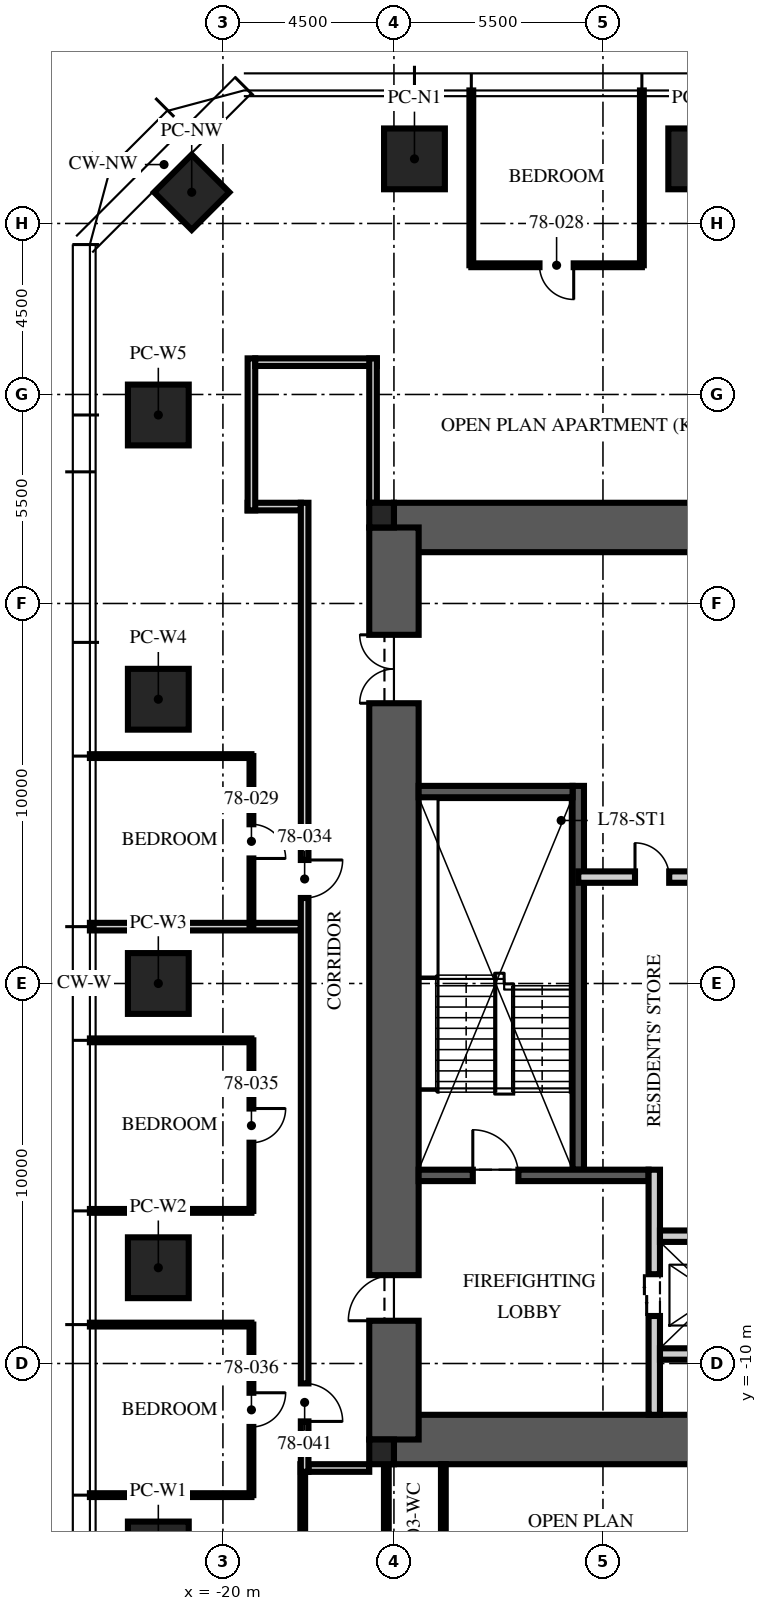
"""IFC4 building model, lengths in metres.
Left out: names, types, materials, properties, quantities, classifications, styles, units other than length and angle.
Written with IfcOpenShell. Run it as: python <this file> out.ifc"""

import sys

from ifc_helpers import new_model, si_unit, direction, frame, frame_2d, origin, origin_2d, place, context, subcontext, project, spatial, rectangle, extrude, element, fill, save


model = new_model("IFC4")
c1 = context("Model", 3, precision=1e-05, world=origin(), true_north=direction((0.0, 1.0)))
c2 = subcontext(c1, "Body", "Model", "MODEL_VIEW")
j1 = project(units=[si_unit("LENGTHUNIT", "METRE"), si_unit("PLANEANGLEUNIT", "RADIAN")], contexts=[c1])
p1 = place(None, origin())
s1 = spatial("IfcSite", under=j1, at=p1, CompositionType="ELEMENT")
p2 = place(p1, origin())
s2 = spatial("IfcBuilding", under=s1, at=p2, CompositionType="ELEMENT")
p3 = place(p2, frame((0.0, 0.0, 312.0)))
s3 = spatial("IfcBuildingStorey", under=s2, at=p3, CompositionType="ELEMENT", Elevation=312.0)
for number, where, z_axis, x_axis in (
    (1, (-15.5, 12.0, -0.25), (0.0, 0.0, 1.0), (1.0, 0.0, 0.0)),
    (2, (-15.5, -12.0, -0.25), (0.0, 0.0, 1.0), (1.0, 0.0, 0.0)),
):
    element("IfcWall", number, at=place(p3, frame(where, z_axis=z_axis, x_axis=x_axis)), inside=s3, PredefinedType="SHEAR", context=c2, shape_type="SweptSolid", body=[
        extrude(rectangle(XDim=31.0, YDim=1.3, at=frame_2d((15.5, 0.0))), origin(), (0.0, 0.0, 1.0), 3.75),
    ])
p4 = place(p3, frame((-15.5, -12.0, -0.25), z_axis=(0.0, 0.0, 1.0), x_axis=(0.0, 1.0, 0.0)))
e3 = element("IfcWall", 3, at=p4, inside=s3, PredefinedType="SHEAR", context=c2, shape_type="SweptSolid", body=[
    extrude(rectangle(XDim=24.0, YDim=1.3, at=frame_2d((12.0, 0.0))), origin(), (0.0, 0.0, 1.0), 3.75),
])
p5 = place(p4, frame((3.125, 0.0, 0.25)))
e4 = element("IfcOpeningElement", 4, at=p5, cuts=e3, PredefinedType="OPENING", context=c2, shape_type="SweptSolid", body=[
    extrude(rectangle(XDim=1.2, YDim=2.1, at=frame_2d((0.6, 1.05))), frame((0.0, 0.66, 0.0), z_axis=(0.0, -1.0, 0.0), x_axis=(1.0, 0.0, 0.0)), (0.0, 0.0, 1.0), 1.32),
])
p6 = place(p4, frame((19.375, 0.0, 0.25)))
e5 = element("IfcOpeningElement", 5, at=p6, cuts=e3, PredefinedType="OPENING", context=c2, shape_type="SweptSolid", body=[
    extrude(rectangle(XDim=1.8, YDim=2.1, at=frame_2d((0.9, 1.05))), frame((0.0, 0.66, 0.0), z_axis=(0.0, -1.0, 0.0), x_axis=(1.0, 0.0, 0.0)), (0.0, 0.0, 1.0), 1.32),
])
for number, where, z_axis, x_axis in (
    (6, (-15.825, 12.325, -0.25), (0.0, 0.0, 1.0), (1.0, 0.0, 0.0)),
    (7, (-15.825, -12.325, -0.25), (0.0, 0.0, 1.0), (1.0, 0.0, 0.0)),
):
    element("IfcColumn", number, at=place(p3, frame(where, z_axis=z_axis, x_axis=x_axis)), inside=s3, PredefinedType="COLUMN", context=c2, shape_type="SweptSolid", body=[
        extrude(rectangle(XDim=0.65, YDim=0.65, at=origin_2d()), origin(), (0.0, 0.0, 1.0), 3.75),
    ])
for number, where, z_axis, x_axis in (
    (8, (-14.96, 21.7, 0.0), (0.0, 0.0, 1.0), (1.0, 0.0, 0.0)),
    (9, (-7.48, 21.7, 0.0), (0.0, 0.0, 1.0), (1.0, 0.0, 0.0)),
    (10, (-21.7, -14.96, 0.0), (0.0, 0.0, 1.0), (0.0, 1.0, 0.0)),
    (11, (-21.7, -7.48, 0.0), (0.0, 0.0, 1.0), (0.0, 1.0, 0.0)),
    (12, (-21.7, 0.0, 0.0), (0.0, 0.0, 1.0), (0.0, 1.0, 0.0)),
    (13, (-21.7, 7.48, 0.0), (0.0, 0.0, 1.0), (0.0, 1.0, 0.0)),
    (14, (-21.7, 14.96, 0.0), (0.0, 0.0, 1.0), (0.0, 1.0, 0.0)),
):
    element("IfcColumn", number, at=place(p3, frame(where, z_axis=z_axis, x_axis=x_axis)), inside=s3, PredefinedType="COLUMN", context=c2, shape_type="SweptSolid", body=[
        extrude(rectangle(XDim=1.6, YDim=1.6, at=origin_2d()), origin(), (0.0, 0.0, 1.0), 3.75),
    ])
p7 = place(p3, frame((-20.821, 20.821, 0.0), z_axis=(0.0, 0.0, 1.0), x_axis=(0.707106781187, 0.707106781187, 0.0)))
e15 = element("IfcColumn", 15, at=p7, inside=s3, PredefinedType="COLUMN", context=c2, shape_type="SweptSolid", body=[
    extrude(rectangle(XDim=1.4, YDim=1.4, at=origin_2d()), origin(), (0.0, 0.0, 1.0), 3.75),
])
p8 = place(p3, frame((-10.65, -4.9, 0.0), z_axis=(0.0, 0.0, 1.0), x_axis=(0.0, 1.0, 0.0)))
e16 = element("IfcWall", 16, at=p8, inside=s3, PredefinedType="SOLIDWALL", context=c2, shape_type="SweptSolid", body=[
    extrude(rectangle(XDim=10.1, YDim=0.3, at=frame_2d((5.05, 0.0))), origin(), (0.0, 0.0, 1.0), 3.5),
])
p9 = place(p3, frame((-14.85, -5.05, 0.0), z_axis=(0.0, 0.0, 1.0), x_axis=(1.0, 0.0, 0.0)))
e17 = element("IfcWall", 17, at=p9, inside=s3, PredefinedType="SOLIDWALL", context=c2, shape_type="SweptSolid", body=[
    extrude(rectangle(XDim=6.05, YDim=0.3, at=frame_2d((3.025, 0.0))), origin(), (0.0, 0.0, 1.0), 3.5),
])
p10 = place(p9, frame((1.425, 0.0, 0.0)))
e18 = element("IfcOpeningElement", 18, at=p10, cuts=e17, PredefinedType="OPENING", context=c2, shape_type="SweptSolid", body=[
    extrude(rectangle(XDim=1.2, YDim=2.1, at=frame_2d((0.6, 1.05))), frame((0.0, 0.16, 0.0), z_axis=(0.0, -1.0, 0.0), x_axis=(1.0, 0.0, 0.0)), (0.0, 0.0, 1.0), 0.32),
])
p11 = place(p3, frame((-14.85, 5.05, 0.0), z_axis=(0.0, 0.0, 1.0), x_axis=(1.0, 0.0, 0.0)))
e19 = element("IfcWall", 19, at=p11, inside=s3, PredefinedType="SOLIDWALL", context=c2, shape_type="SweptSolid", body=[
    extrude(rectangle(XDim=4.05, YDim=0.3, at=frame_2d((2.025, 0.0))), origin(), (0.0, 0.0, 1.0), 3.5),
])
p12 = place(p3, frame((-8.65, -11.35, 0.0), z_axis=(0.0, 0.0, 1.0), x_axis=(0.0, 1.0, 0.0)))
e20 = element("IfcWall", 20, at=p12, inside=s3, PredefinedType="PARTITIONING", context=c2, shape_type="SweptSolid", body=[
    extrude(rectangle(XDim=6.45, YDim=0.3, at=frame_2d((3.225, 0.0))), origin(), (0.0, 0.0, 1.0), 3.5),
])
p13 = place(p12, frame((2.6, 0.0, 0.0)))
e21 = element("IfcOpeningElement", 21, at=p13, cuts=e20, PredefinedType="OPENING", context=c2, shape_type="SweptSolid", body=[
    extrude(rectangle(XDim=1.1, YDim=2.1, at=frame_2d((0.55, 1.05))), frame((0.0, 0.16, 0.0), z_axis=(0.0, -1.0, 0.0), x_axis=(1.0, 0.0, 0.0)), (0.0, 0.0, 1.0), 0.32),
])
p14 = place(p3, frame((-8.5, -6.65, 0.0), z_axis=(0.0, 0.0, 1.0), x_axis=(1.0, 0.0, 0.0)))
e22 = element("IfcWall", 22, at=p14, inside=s3, PredefinedType="PARTITIONING", context=c2, shape_type="SweptSolid", body=[
    extrude(rectangle(XDim=17.0, YDim=0.3, at=frame_2d((8.5, 0.0))), origin(), (0.0, 0.0, 1.0), 3.5),
])
p15 = place(p14, frame((7.8, 0.0, 0.0)))
e23 = element("IfcOpeningElement", 23, at=p15, cuts=e22, PredefinedType="OPENING", context=c2, shape_type="SweptSolid", body=[
    extrude(rectangle(XDim=1.3, YDim=2.4, at=frame_2d((0.65, 1.2))), frame((0.0, 0.16, 0.0), z_axis=(0.0, -1.0, 0.0), x_axis=(1.0, 0.0, 0.0)), (0.0, 0.0, 1.0), 0.32),
])
p16 = place(p14, frame((5.65, 0.0, 0.0)))
e24 = element("IfcOpeningElement", 24, at=p16, cuts=e22, PredefinedType="OPENING", context=c2, shape_type="SweptSolid", body=[
    extrude(rectangle(XDim=0.9, YDim=2.1, at=frame_2d((0.45, 1.05))), frame((0.0, 0.16, 0.0), z_axis=(0.0, -1.0, 0.0), x_axis=(1.0, 0.0, 0.0)), (0.0, 0.0, 1.0), 0.32),
])
p17 = place(p14, frame((10.4, 0.0, 0.0)))
e25 = element("IfcOpeningElement", 25, at=p17, cuts=e22, PredefinedType="OPENING", context=c2, shape_type="SweptSolid", body=[
    extrude(rectangle(XDim=0.9, YDim=2.1, at=frame_2d((0.45, 1.05))), frame((0.0, 0.16, 0.0), z_axis=(0.0, -1.0, 0.0), x_axis=(1.0, 0.0, 0.0)), (0.0, 0.0, 1.0), 0.32),
])
p18 = place(p3, frame((-8.5, -9.75, 0.0), z_axis=(0.0, 0.0, 1.0), x_axis=(1.0, 0.0, 0.0)))
e26 = element("IfcWall", 26, at=p18, inside=s3, PredefinedType="PARTITIONING", context=c2, shape_type="SweptSolid", body=[
    extrude(rectangle(XDim=2.9, YDim=0.3, at=frame_2d((1.45, 0.0))), origin(), (0.0, 0.0, 1.0), 3.5),
])
p19 = place(p3, frame((-10.65, 2.8, 0.0), z_axis=(0.0, 0.0, 1.0), x_axis=(1.0, 0.0, 0.0)))
e27 = element("IfcWall", 27, at=p19, inside=s3, PredefinedType="PARTITIONING", context=c2, shape_type="SweptSolid", body=[
    extrude(rectangle(XDim=21.3, YDim=0.3, at=frame_2d((10.65, 0.0))), origin(), (0.0, 0.0, 1.0), 3.5),
])
p20 = place(p19, frame((10.05, 0.0, 0.0)))
e28 = element("IfcOpeningElement", 28, at=p20, cuts=e27, PredefinedType="OPENING", context=c2, shape_type="SweptSolid", body=[
    extrude(rectangle(XDim=1.2, YDim=2.1, at=frame_2d((0.6, 1.05))), frame((0.0, 0.16, 0.0), z_axis=(0.0, -1.0, 0.0), x_axis=(1.0, 0.0, 0.0)), (0.0, 0.0, 1.0), 0.32),
])
p21 = place(p19, frame((1.493, 0.0, 0.0)))
e29 = element("IfcOpeningElement", 29, at=p21, cuts=e27, PredefinedType="OPENING", context=c2, shape_type="SweptSolid", body=[
    extrude(rectangle(XDim=0.9, YDim=2.1, at=frame_2d((0.45, 1.05))), frame((0.0, 0.16, 0.0), z_axis=(0.0, -1.0, 0.0), x_axis=(1.0, 0.0, 0.0)), (0.0, 0.0, 1.0), 0.32),
])
p22 = place(p19, frame((18.836, 0.0, 0.0)))
e30 = element("IfcOpeningElement", 30, at=p22, cuts=e27, PredefinedType="OPENING", context=c2, shape_type="SweptSolid", body=[
    extrude(rectangle(XDim=0.9, YDim=2.1, at=frame_2d((0.45, 1.05))), frame((0.0, 0.16, 0.0), z_axis=(0.0, -1.0, 0.0), x_axis=(1.0, 0.0, 0.0)), (0.0, 0.0, 1.0), 0.32),
])
p23 = place(p3, frame((-17.95, 12.55, 0.0), z_axis=(0.0, 0.0, 1.0), x_axis=(-1.0, 0.0, 0.0)))
e31 = element("IfcWall", 31, at=p23, inside=s3, PredefinedType="PARTITIONING", context=c2, shape_type="SweptSolid", body=[
    extrude(rectangle(XDim=1.4, YDim=0.2, at=frame_2d((0.7, 0.0))), origin(), (0.0, 0.0, 1.0), 3.5),
])
p24 = place(p3, frame((-19.25, 12.45, 0.0), z_axis=(0.0, 0.0, 1.0), x_axis=(0.0, 1.0, 0.0)))
e32 = element("IfcWall", 32, at=p24, inside=s3, PredefinedType="PARTITIONING", context=c2, shape_type="SweptSolid", body=[
    extrude(rectangle(XDim=4.0, YDim=0.2, at=frame_2d((2.0, 0.0))), origin(), (0.0, 0.0, 1.0), 2.9),
])
p25 = place(p3, frame((-19.15, 16.35, 0.0), z_axis=(0.0, 0.0, 1.0), x_axis=(1.0, 0.0, 0.0)))
e33 = element("IfcWall", 33, at=p25, inside=s3, PredefinedType="PARTITIONING", context=c2, shape_type="SweptSolid", body=[
    extrude(rectangle(XDim=3.2, YDim=0.2, at=frame_2d((1.6, 0.0))), origin(), (0.0, 0.0, 1.0), 2.6),
])
p26 = place(p3, frame((-16.05, 16.45, 0.0), z_axis=(0.0, 0.0, 1.0), x_axis=(0.0, -1.0, 0.0)))
e34 = element("IfcWall", 34, at=p26, inside=s3, PredefinedType="PARTITIONING", context=c2, shape_type="SweptSolid", body=[
    extrude(rectangle(XDim=3.8, YDim=0.2, at=frame_2d((1.9, 0.0))), origin(), (0.0, 0.0, 1.0), 2.6),
])
p27 = place(p3, frame((-16.15, -12.75, 0.0), z_axis=(0.0, 0.0, 1.0), x_axis=(-1.0, 0.0, 0.0)))
e35 = element("IfcWall", 35, at=p27, inside=s3, PredefinedType="PARTITIONING", context=c2, shape_type="SweptSolid", body=[
    extrude(rectangle(XDim=1.6, YDim=0.2, at=frame_2d((0.8, 0.0))), origin(), (0.0, 0.0, 1.0), 2.6),
])
for number, where, z_axis, x_axis in (
    (36, (-8.976, 18.9, 0.0), (0.0, 0.0, 1.0), (0.0, 1.0, 0.0)),
    (37, (-13.464, 18.9, 0.0), (0.0, 0.0, 1.0), (0.0, 1.0, 0.0)),
):
    element("IfcWall", number, at=place(p3, frame(where, z_axis=z_axis, x_axis=x_axis)), inside=s3, PredefinedType="PARTITIONING", context=c2, shape_type="SweptSolid", body=[
        extrude(rectangle(XDim=4.6, YDim=0.1, at=frame_2d((2.3, 0.0))), origin(), (0.0, 0.0, 1.0), 3.01),
    ])
p28 = place(p3, frame((-19.25, 5.984, 0.0), z_axis=(0.0, 0.0, 1.0), x_axis=(-1.0, 0.0, 0.0)))
e38 = element("IfcWall", 38, at=p28, inside=s3, PredefinedType="PARTITIONING", context=c2, shape_type="SweptSolid", body=[
    extrude(rectangle(XDim=4.25, YDim=0.1, at=frame_2d((2.125, 0.0))), origin(), (0.0, 0.0, 1.0), 3.01),
])
p29 = place(p3, frame((-17.95, 1.496, 0.0), z_axis=(0.0, 0.0, 1.0), x_axis=(-1.0, 0.0, 0.0)))
e39 = element("IfcWall", 39, at=p29, inside=s3, PredefinedType="PARTITIONING", context=c2, shape_type="SweptSolid", body=[
    extrude(rectangle(XDim=5.55, YDim=0.2, at=frame_2d((2.775, 0.0))), origin(), (0.0, 0.0, 1.0), 3.01),
])
for number, where, z_axis, x_axis in (
    (40, (-19.25, -1.496, 0.0), (0.0, 0.0, 1.0), (-1.0, 0.0, 0.0)),
    (41, (-19.25, -5.984, 0.0), (0.0, 0.0, 1.0), (-1.0, 0.0, 0.0)),
    (42, (-19.25, -8.976, 0.0), (0.0, 0.0, 1.0), (-1.0, 0.0, 0.0)),
    (43, (-19.25, -13.464, 0.0), (0.0, 0.0, 1.0), (-1.0, 0.0, 0.0)),
):
    element("IfcWall", number, at=place(p3, frame(where, z_axis=z_axis, x_axis=x_axis)), inside=s3, PredefinedType="PARTITIONING", context=c2, shape_type="SweptSolid", body=[
        extrude(rectangle(XDim=4.25, YDim=0.1, at=frame_2d((2.125, 0.0))), origin(), (0.0, 0.0, 1.0), 3.01),
    ])
p30 = place(p3, frame((-8.976, 18.9, 0.0), z_axis=(0.0, 0.0, 1.0), x_axis=(-1.0, 0.0, 0.0)))
e44 = element("IfcWall", 44, at=p30, inside=s3, PredefinedType="PARTITIONING", context=c2, shape_type="SweptSolid", body=[
    extrude(rectangle(XDim=4.488, YDim=0.1, at=frame_2d((2.244, 0.0))), origin(), (0.0, 0.0, 1.0), 2.91),
])
p31 = place(p30, frame((1.794, 0.0, 0.0)))
e45 = element("IfcOpeningElement", 45, at=p31, cuts=e44, PredefinedType="OPENING", context=c2, shape_type="SweptSolid", body=[
    extrude(rectangle(XDim=0.9, YDim=2.1, at=frame_2d((0.45, 1.05))), frame((0.0, 0.06, 0.0), z_axis=(0.0, -1.0, 0.0), x_axis=(1.0, 0.0, 0.0)), (0.0, 0.0, 1.0), 0.12),
])
p32 = place(p3, frame((-19.25, 5.984, 0.0), z_axis=(0.0, 0.0, 1.0), x_axis=(0.0, -1.0, 0.0)))
e46 = element("IfcWall", 46, at=p32, inside=s3, PredefinedType="PARTITIONING", context=c2, shape_type="SweptSolid", body=[
    extrude(rectangle(XDim=4.488, YDim=0.1, at=frame_2d((2.244, 0.0))), origin(), (0.0, 0.0, 1.0), 2.91),
])
p33 = place(p32, frame((1.794, 0.0, 0.0)))
e47 = element("IfcOpeningElement", 47, at=p33, cuts=e46, PredefinedType="OPENING", context=c2, shape_type="SweptSolid", body=[
    extrude(rectangle(XDim=0.9, YDim=2.1, at=frame_2d((0.45, 1.05))), frame((0.0, 0.06, 0.0), z_axis=(0.0, -1.0, 0.0), x_axis=(1.0, 0.0, 0.0)), (0.0, 0.0, 1.0), 0.12),
])
p34 = place(p3, frame((-19.25, -1.496, 0.0), z_axis=(0.0, 0.0, 1.0), x_axis=(0.0, -1.0, 0.0)))
e48 = element("IfcWall", 48, at=p34, inside=s3, PredefinedType="PARTITIONING", context=c2, shape_type="SweptSolid", body=[
    extrude(rectangle(XDim=4.488, YDim=0.1, at=frame_2d((2.244, 0.0))), origin(), (0.0, 0.0, 1.0), 2.91),
])
p35 = place(p34, frame((1.794, 0.0, 0.0)))
e49 = element("IfcOpeningElement", 49, at=p35, cuts=e48, PredefinedType="OPENING", context=c2, shape_type="SweptSolid", body=[
    extrude(rectangle(XDim=0.9, YDim=2.1, at=frame_2d((0.45, 1.05))), frame((0.0, 0.06, 0.0), z_axis=(0.0, -1.0, 0.0), x_axis=(1.0, 0.0, 0.0)), (0.0, 0.0, 1.0), 0.12),
])
p36 = place(p3, frame((-19.25, -8.976, 0.0), z_axis=(0.0, 0.0, 1.0), x_axis=(0.0, -1.0, 0.0)))
e50 = element("IfcWall", 50, at=p36, inside=s3, PredefinedType="PARTITIONING", context=c2, shape_type="SweptSolid", body=[
    extrude(rectangle(XDim=4.488, YDim=0.1, at=frame_2d((2.244, 0.0))), origin(), (0.0, 0.0, 1.0), 2.91),
])
p37 = place(p36, frame((1.794, 0.0, 0.0)))
e51 = element("IfcOpeningElement", 51, at=p37, cuts=e50, PredefinedType="OPENING", context=c2, shape_type="SweptSolid", body=[
    extrude(rectangle(XDim=0.9, YDim=2.1, at=frame_2d((0.45, 1.05))), frame((0.0, 0.06, 0.0), z_axis=(0.0, -1.0, 0.0), x_axis=(1.0, 0.0, 0.0)), (0.0, 0.0, 1.0), 0.12),
])
for number, where, z_axis, x_axis in (
    (52, (-17.9, -12.65, 0.0), (0.0, 0.0, 1.0), (0.0, -1.0, 0.0)),
    (53, (-15.7, -12.65, 0.0), (0.0, 0.0, 1.0), (0.0, -1.0, 0.0)),
):
    element("IfcWall", number, at=place(p3, frame(where, z_axis=z_axis, x_axis=x_axis)), inside=s3, PredefinedType="PARTITIONING", context=c2, shape_type="SweptSolid", body=[
        extrude(rectangle(XDim=4.096, YDim=0.125, at=frame_2d((2.048, 0.0))), origin(), (0.0, 0.0, 1.0), 2.6),
    ])
p38 = place(p3, frame((-14.2, -12.65, 0.0), z_axis=(0.0, 0.0, 1.0), x_axis=(0.0, -1.0, 0.0)))
e54 = element("IfcWall", 54, at=p38, inside=s3, PredefinedType="PARTITIONING", context=c2, shape_type="SweptSolid", body=[
    extrude(rectangle(XDim=4.096, YDim=0.125, at=frame_2d((2.048, 0.0))), origin(), (0.0, 0.0, 1.0), 3.5),
])
p39 = place(p3, frame((-17.85, 12.65, 0.0), z_axis=(0.0, 0.0, 1.0), x_axis=(0.0, -1.0, 0.0)))
e55 = element("IfcWall", 55, at=p39, inside=s3, PredefinedType="PARTITIONING", context=c2, shape_type="SweptSolid", body=[
    extrude(rectangle(XDim=25.5, YDim=0.2, at=frame_2d((12.75, 0.0))), origin(), (0.0, 0.0, 1.0), 2.9),
])
p40 = place(p39, frame((9.4, 0.0, 0.0)))
e56 = element("IfcOpeningElement", 56, at=p40, cuts=e55, PredefinedType="OPENING", context=c2, shape_type="SweptSolid", body=[
    extrude(rectangle(XDim=1.0, YDim=2.2, at=frame_2d((0.5, 1.1))), frame((0.0, 0.11, 0.0), z_axis=(0.0, -1.0, 0.0), x_axis=(1.0, 0.0, 0.0)), (0.0, 0.0, 1.0), 0.22),
])
p41 = place(p39, frame((23.174, 0.0, 0.0)))
e57 = element("IfcOpeningElement", 57, at=p41, cuts=e55, PredefinedType="OPENING", context=c2, shape_type="SweptSolid", body=[
    extrude(rectangle(XDim=1.0, YDim=2.2, at=frame_2d((0.5, 1.1))), frame((0.0, 0.11, 0.0), z_axis=(0.0, -1.0, 0.0), x_axis=(1.0, 0.0, 0.0)), (0.0, 0.0, 1.0), 0.22),
])
p42 = place(p10, origin())
e58 = element("IfcDoor", 58, at=p42, inside=s3, OperationType="SINGLE_SWING_LEFT", PredefinedType="DOOR", context=c2, shape_type="SweptSolid", body=[
    extrude(rectangle(XDim=1.2, YDim=2.1, at=frame_2d((0.6, 1.05))), frame((0.0, 0.025, 0.0), z_axis=(0.0, -1.0, 0.0), x_axis=(1.0, 0.0, 0.0)), (0.0, 0.0, 1.0), 0.05),
])
fill(e18, e58)
p43 = place(p5, origin())
e59 = element("IfcDoor", 59, at=p43, inside=s3, OperationType="SINGLE_SWING_LEFT", PredefinedType="DOOR", context=c2, shape_type="SweptSolid", body=[
    extrude(rectangle(XDim=1.2, YDim=2.1, at=frame_2d((0.6, 1.05))), frame((0.0, 0.025, 0.0), z_axis=(0.0, -1.0, 0.0), x_axis=(1.0, 0.0, 0.0)), (0.0, 0.0, 1.0), 0.05),
])
fill(e4, e59)
p44 = place(p6, origin())
e60 = element("IfcDoor", 60, at=p44, inside=s3, OperationType="DOUBLE_DOOR_SINGLE_SWING", PredefinedType="DOOR", context=c2, shape_type="SweptSolid", body=[
    extrude(rectangle(XDim=1.8, YDim=2.1, at=frame_2d((0.9, 1.05))), frame((0.0, 0.025, 0.0), z_axis=(0.0, -1.0, 0.0), x_axis=(1.0, 0.0, 0.0)), (0.0, 0.0, 1.0), 0.05),
])
fill(e5, e60)
p45 = place(p13, origin())
e61 = element("IfcDoor", 61, at=p45, inside=s3, OperationType="DOUBLE_DOOR_SLIDING", PredefinedType="DOOR", context=c2, shape_type="SweptSolid", body=[
    extrude(rectangle(XDim=1.1, YDim=2.1, at=frame_2d((0.55, 1.05))), frame((0.0, 0.025, 0.0), z_axis=(0.0, -1.0, 0.0), x_axis=(1.0, 0.0, 0.0)), (0.0, 0.0, 1.0), 0.05),
])
fill(e21, e61)
p46 = place(p21, origin())
e62 = element("IfcDoor", 62, at=p46, inside=s3, OperationType="SINGLE_SWING_LEFT", PredefinedType="DOOR", context=c2, shape_type="SweptSolid", body=[
    extrude(rectangle(XDim=0.9, YDim=2.1, at=frame_2d((0.45, 1.05))), frame((0.0, 0.025, 0.0), z_axis=(0.0, -1.0, 0.0), x_axis=(1.0, 0.0, 0.0)), (0.0, 0.0, 1.0), 0.05),
])
fill(e29, e62)
p47 = place(p31, origin())
e63 = element("IfcDoor", 63, at=p47, inside=s3, OperationType="SINGLE_SWING_LEFT", PredefinedType="DOOR", context=c2, shape_type="SweptSolid", body=[
    extrude(rectangle(XDim=0.9, YDim=2.1, at=frame_2d((0.45, 1.05))), frame((0.0, 0.025, 0.0), z_axis=(0.0, -1.0, 0.0), x_axis=(1.0, 0.0, 0.0)), (0.0, 0.0, 1.0), 0.05),
])
fill(e45, e63)
p48 = place(p33, origin())
e64 = element("IfcDoor", 64, at=p48, inside=s3, OperationType="SINGLE_SWING_RIGHT", PredefinedType="DOOR", context=c2, shape_type="SweptSolid", body=[
    extrude(rectangle(XDim=0.9, YDim=2.1, at=frame_2d((0.45, 1.05))), frame((0.0, 0.025, 0.0), z_axis=(0.0, -1.0, 0.0), x_axis=(1.0, 0.0, 0.0)), (0.0, 0.0, 1.0), 0.05),
])
fill(e47, e64)
p49 = place(p40, origin())
e65 = element("IfcDoor", 65, at=p49, inside=s3, OperationType="SINGLE_SWING_LEFT", PredefinedType="DOOR", context=c2, shape_type="SweptSolid", body=[
    extrude(rectangle(XDim=1.0, YDim=2.2, at=frame_2d((0.5, 1.1))), frame((0.0, 0.025, 0.0), z_axis=(0.0, -1.0, 0.0), x_axis=(1.0, 0.0, 0.0)), (0.0, 0.0, 1.0), 0.05),
])
fill(e56, e65)
p50 = place(p35, origin())
e66 = element("IfcDoor", 66, at=p50, inside=s3, OperationType="SINGLE_SWING_LEFT", PredefinedType="DOOR", context=c2, shape_type="SweptSolid", body=[
    extrude(rectangle(XDim=0.9, YDim=2.1, at=frame_2d((0.45, 1.05))), frame((0.0, 0.025, 0.0), z_axis=(0.0, -1.0, 0.0), x_axis=(1.0, 0.0, 0.0)), (0.0, 0.0, 1.0), 0.05),
])
fill(e49, e66)
p51 = place(p37, origin())
e67 = element("IfcDoor", 67, at=p51, inside=s3, OperationType="SINGLE_SWING_LEFT", PredefinedType="DOOR", context=c2, shape_type="SweptSolid", body=[
    extrude(rectangle(XDim=0.9, YDim=2.1, at=frame_2d((0.45, 1.05))), frame((0.0, 0.025, 0.0), z_axis=(0.0, -1.0, 0.0), x_axis=(1.0, 0.0, 0.0)), (0.0, 0.0, 1.0), 0.05),
])
fill(e51, e67)
p52 = place(p41, origin())
e68 = element("IfcDoor", 68, at=p52, inside=s3, OperationType="SINGLE_SWING_RIGHT", PredefinedType="DOOR", context=c2, shape_type="SweptSolid", body=[
    extrude(rectangle(XDim=1.0, YDim=2.2, at=frame_2d((0.5, 1.1))), frame((0.0, 0.025, 0.0), z_axis=(0.0, -1.0, 0.0), x_axis=(1.0, 0.0, 0.0)), (0.0, 0.0, 1.0), 0.05),
])
fill(e57, e68)
save(model, sys.argv[1])
